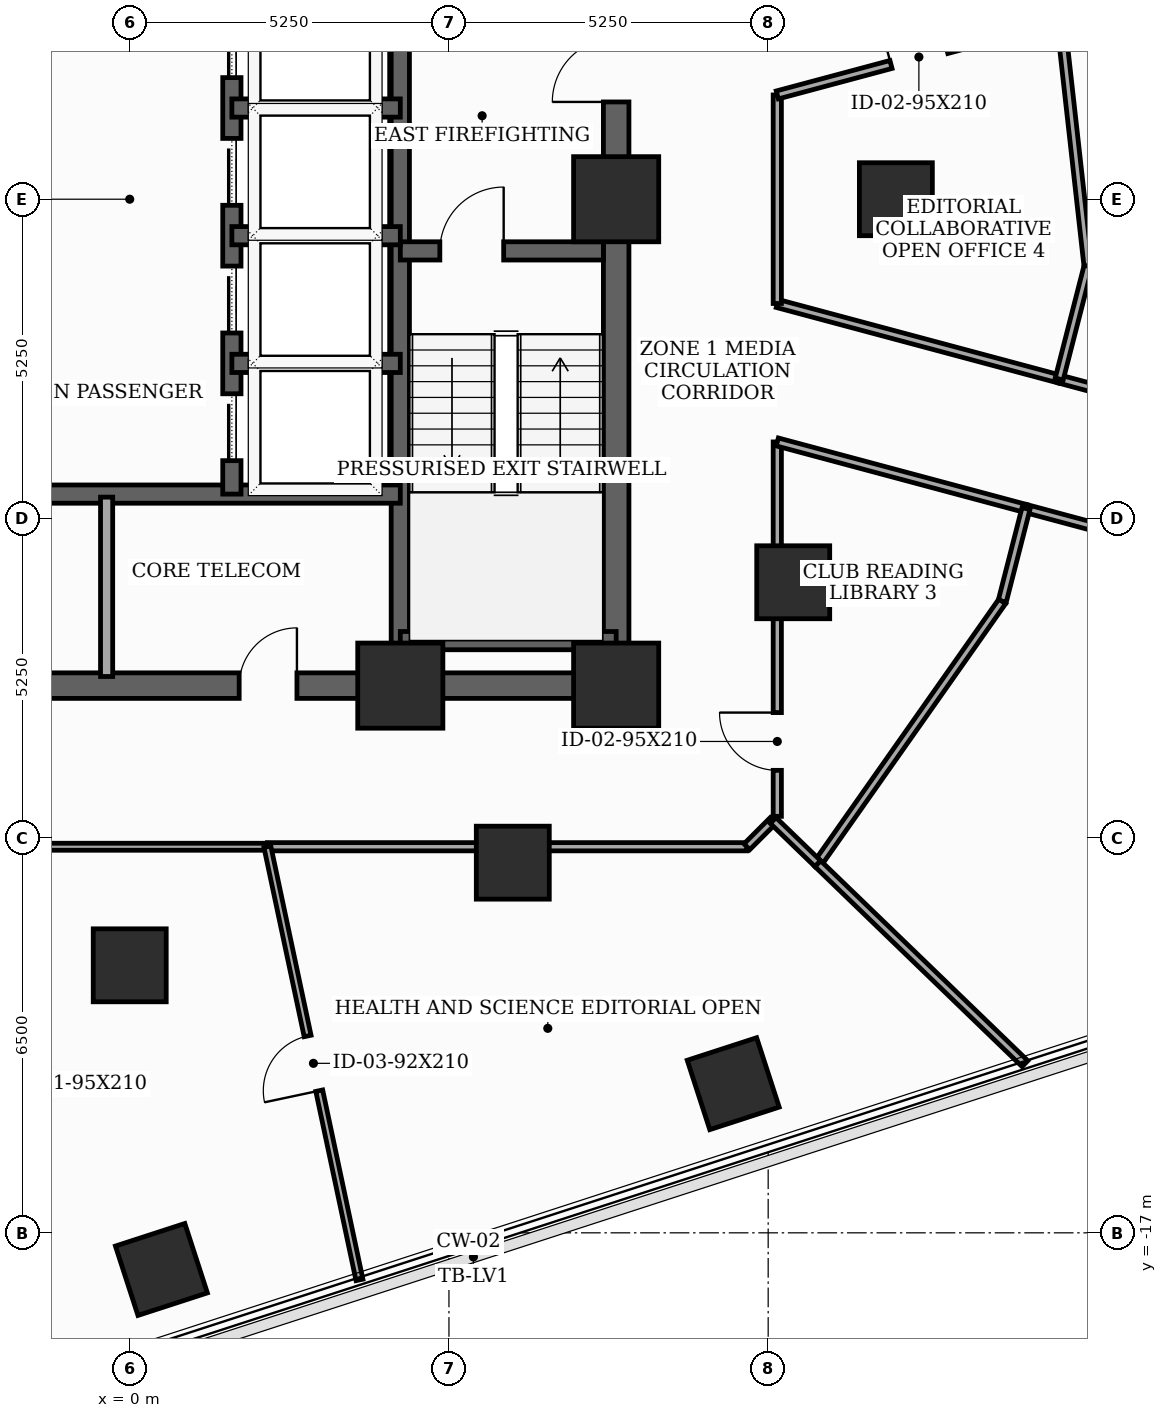
"""IFC4 building model, lengths in metres.
Left out: names, types, materials, properties, quantities, classifications, styles, units other than length and angle.
Written with IfcOpenShell. Run it as: python <this file> out.ifc"""

import sys

from ifc_helpers import new_model, si_unit, direction, frame, frame_2d, origin, origin_2d, place, context, subcontext, project, spatial, rectangle, extrude, element, fill, save


model = new_model("IFC4")
c1 = context("Model", 3, precision=1e-05, world=origin(), true_north=direction((0.0, 1.0)))
c2 = subcontext(c1, "Body", "Model", "MODEL_VIEW")
j1 = project(units=[si_unit("LENGTHUNIT", "METRE"), si_unit("PLANEANGLEUNIT", "RADIAN")], contexts=[c1])
p1 = place(None, origin())
s1 = spatial("IfcSite", under=j1, at=p1, CompositionType="ELEMENT")
p2 = place(p1, origin())
s2 = spatial("IfcBuilding", under=s1, at=p2, CompositionType="ELEMENT")
p3 = place(p2, frame((0.0, 0.0, 101.4)))
s3 = spatial("IfcBuildingStorey", under=s2, at=p3, CompositionType="ELEMENT", Elevation=101.4)
for number, where, z_axis, x_axis in (
    (1, (4.45, -8.0, 0.0), (0.0, 0.0, 1.0), (1.0, 0.0, 0.0)),
    (2, (8.0, -8.0, 0.0), (0.0, 0.0, 1.0), (1.0, 0.0, 0.0)),
    (3, (8.0, 0.0, 0.0), (0.0, 0.0, 1.0), (1.0, 0.0, 0.0)),
):
    element("IfcColumn", number, at=place(p3, frame(where, z_axis=z_axis, x_axis=x_axis)), inside=s3, PredefinedType="COLUMN", context=c2, shape_type="SweptSolid", body=[
        extrude(rectangle(XDim=1.4, YDim=1.4, at=origin_2d()), origin(), (0.0, 0.0, 1.0), 3.7),
    ])
for number, where, z_axis, x_axis in (
    (4, (12.6, 0.0, 0.0), (0.0, 0.0, 1.0), (1.0, 0.0, 0.0)),
    (5, (0.0, -12.6, 0.0), (0.0, 0.0, 1.0), (1.0, 0.0, 0.0)),
    (6, (6.3, -10.912, 0.0), (0.0, 0.0, 1.0), (1.0, 0.0, 0.0)),
    (7, (10.912, -6.3, 0.0), (0.0, 0.0, 1.0), (1.0, 0.0, 0.0)),
    (8, (0.521, -17.603, 0.0), (0.0, 0.0, 1.0), (0.951, 0.309, 0.0)),
    (9, (9.925, -14.547, 0.0), (0.0, 0.0, 1.0), (0.951, 0.309, 0.0)),
):
    element("IfcColumn", number, at=place(p3, frame(where, z_axis=z_axis, x_axis=x_axis)), inside=s3, PredefinedType="COLUMN", context=c2, shape_type="SweptSolid", body=[
        extrude(rectangle(XDim=1.2, YDim=1.2, at=origin_2d()), origin(), (0.0, 0.0, 1.0), 3.7),
    ])
p4 = place(p3, frame((8.0, -8.0, 0.0), z_axis=(0.0, 0.0, 1.0), x_axis=(0.0, 1.0, 0.0)))
e10 = element("IfcWall", 10, at=p4, inside=s3, PredefinedType="SHEAR", context=c2, shape_type="SweptSolid", body=[
    extrude(rectangle(XDim=16.0, YDim=0.42, at=frame_2d((8.0, 0.0))), origin(), (0.0, 0.0, 1.0), 3.5),
])
p5 = place(p4, frame((9.6, 0.0, 0.0)))
e11 = element("IfcOpeningElement", 11, at=p5, cuts=e10, PredefinedType="OPENING", context=c2, shape_type="SweptSolid", body=[
    extrude(rectangle(XDim=1.05, YDim=2.15, at=frame_2d((0.525, 1.075))), frame((0.0, 0.22, 0.0), z_axis=(0.0, -1.0, 0.0), x_axis=(1.0, 0.0, 0.0)), (0.0, 0.0, 1.0), 0.44),
])
p6 = place(p4, frame((14.229, 0.0, 0.0)))
e12 = element("IfcOpeningElement", 12, at=p6, cuts=e10, PredefinedType="OPENING", context=c2, shape_type="SweptSolid", body=[
    extrude(rectangle(XDim=0.85, YDim=2.02, at=frame_2d((0.425, 1.01))), frame((0.0, 0.22, 0.0), z_axis=(0.0, -1.0, 0.0), x_axis=(1.0, 0.0, 0.0)), (0.0, 0.0, 1.0), 0.44),
])
p7 = place(p3, frame((-8.0, -8.0, 0.0), z_axis=(0.0, 0.0, 1.0), x_axis=(1.0, 0.0, 0.0)))
e13 = element("IfcWall", 13, at=p7, inside=s3, PredefinedType="SHEAR", context=c2, shape_type="SweptSolid", body=[
    extrude(rectangle(XDim=16.0, YDim=0.42, at=frame_2d((8.0, 0.0))), origin(), (0.0, 0.0, 1.0), 3.5),
])
p8 = place(p7, frame((5.2, 0.0, 0.0)))
e14 = element("IfcOpeningElement", 14, at=p8, cuts=e13, PredefinedType="OPENING", context=c2, shape_type="SweptSolid", body=[
    extrude(rectangle(XDim=0.95, YDim=2.1, at=frame_2d((0.475, 1.05))), frame((0.0, 0.22, 0.0), z_axis=(0.0, -1.0, 0.0), x_axis=(1.0, 0.0, 0.0)), (0.0, 0.0, 1.0), 0.44),
])
p9 = place(p7, frame((9.8, 0.0, 0.0)))
e15 = element("IfcOpeningElement", 15, at=p9, cuts=e13, PredefinedType="OPENING", context=c2, shape_type="SweptSolid", body=[
    extrude(rectangle(XDim=0.95, YDim=2.1, at=frame_2d((0.475, 1.05))), frame((0.0, 0.22, 0.0), z_axis=(0.0, -1.0, 0.0), x_axis=(1.0, 0.0, 0.0)), (0.0, 0.0, 1.0), 0.44),
])
p10 = place(p3, frame((4.45, -7.79, 0.0), z_axis=(0.0, 0.0, 1.0), x_axis=(0.0, 1.0, 0.0)))
e16 = element("IfcWall", 16, at=p10, inside=s3, PredefinedType="SHEAR", context=c2, shape_type="SweptSolid", body=[
    extrude(rectangle(XDim=15.58, YDim=0.3, at=frame_2d((7.79, 0.0))), origin(), (0.0, 0.0, 1.0), 3.5),
])
p11 = place(p3, frame((4.45, -0.85, 0.0), z_axis=(0.0, 0.0, 1.0), x_axis=(1.0, 0.0, 0.0)))
e17 = element("IfcWall", 17, at=p11, inside=s3, PredefinedType="SHEAR", context=c2, shape_type="SweptSolid", body=[
    extrude(rectangle(XDim=3.34, YDim=0.3, at=frame_2d((1.67, 0.0))), origin(), (0.0, 0.0, 1.0), 3.5),
])
p12 = place(p11, frame((0.65, 0.0, 0.0)))
e18 = element("IfcOpeningElement", 18, at=p12, cuts=e17, PredefinedType="OPENING", context=c2, shape_type="SweptSolid", body=[
    extrude(rectangle(XDim=1.05, YDim=2.15, at=frame_2d((0.525, 1.075))), frame((0.0, 0.16, 0.0), z_axis=(0.0, -1.0, 0.0), x_axis=(1.0, 0.0, 0.0)), (0.0, 0.0, 1.0), 0.32),
])
p13 = place(p3, frame((4.45, -7.26, 0.0), z_axis=(0.0, 0.0, 1.0), x_axis=(1.0, 0.0, 0.0)))
e19 = element("IfcWall", 19, at=p13, inside=s3, PredefinedType="SHEAR", context=c2, shape_type="SweptSolid", body=[
    extrude(rectangle(XDim=3.55, YDim=0.3, at=frame_2d((1.775, 0.0))), origin(), (0.0, 0.0, 1.0), 3.5),
])
p14 = place(p3, frame((-4.45, -4.85, 0.0), z_axis=(0.0, 0.0, 1.0), x_axis=(1.0, 0.0, 0.0)))
e20 = element("IfcWall", 20, at=p14, inside=s3, PredefinedType="SHEAR", context=c2, shape_type="SweptSolid", body=[
    extrude(rectangle(XDim=8.9, YDim=0.3, at=frame_2d((4.45, 0.0))), origin(), (0.0, 0.0, 1.0), 3.5),
])
p15 = place(p3, frame((1.68, -4.85, 0.0), z_axis=(0.0, 0.0, 1.0), x_axis=(0.0, 1.0, 0.0)))
e21 = element("IfcWall", 21, at=p15, inside=s3, PredefinedType="SHEAR", context=c2, shape_type="SweptSolid", body=[
    extrude(rectangle(XDim=12.64, YDim=0.3, at=frame_2d((6.32, 0.0))), origin(), (0.0, 0.0, 1.0), 3.5),
])
p16 = place(p15, frame((0.55, 0.0, 0.0)))
e22 = element("IfcOpeningElement", 22, at=p16, cuts=e21, PredefinedType="OPENING", context=c2, shape_type="SweptSolid", body=[
    extrude(rectangle(XDim=1.1, YDim=2.1, at=frame_2d((0.55, 1.05))), frame((0.0, 0.16, 0.0), z_axis=(0.0, -1.0, 0.0), x_axis=(1.0, 0.0, 0.0)), (0.0, 0.0, 1.0), 0.32),
])
p17 = place(p15, frame((2.65, 0.0, 0.0)))
e23 = element("IfcOpeningElement", 23, at=p17, cuts=e21, PredefinedType="OPENING", context=c2, shape_type="SweptSolid", body=[
    extrude(rectangle(XDim=1.1, YDim=2.1, at=frame_2d((0.55, 1.05))), frame((0.0, 0.16, 0.0), z_axis=(0.0, -1.0, 0.0), x_axis=(1.0, 0.0, 0.0)), (0.0, 0.0, 1.0), 0.32),
])
p18 = place(p15, frame((4.75, 0.0, 0.0)))
e24 = element("IfcOpeningElement", 24, at=p18, cuts=e21, PredefinedType="OPENING", context=c2, shape_type="SweptSolid", body=[
    extrude(rectangle(XDim=1.1, YDim=2.1, at=frame_2d((0.55, 1.05))), frame((0.0, 0.16, 0.0), z_axis=(0.0, -1.0, 0.0), x_axis=(1.0, 0.0, 0.0)), (0.0, 0.0, 1.0), 0.32),
])
p19 = place(p15, frame((6.85, 0.0, 0.0)))
e25 = element("IfcOpeningElement", 25, at=p19, cuts=e21, PredefinedType="OPENING", context=c2, shape_type="SweptSolid", body=[
    extrude(rectangle(XDim=1.1, YDim=2.1, at=frame_2d((0.55, 1.05))), frame((0.0, 0.16, 0.0), z_axis=(0.0, -1.0, 0.0), x_axis=(1.0, 0.0, 0.0)), (0.0, 0.0, 1.0), 0.32),
])
p20 = place(p15, frame((8.95, 0.0, 0.0)))
e26 = element("IfcOpeningElement", 26, at=p20, cuts=e21, PredefinedType="OPENING", context=c2, shape_type="SweptSolid", body=[
    extrude(rectangle(XDim=1.1, YDim=2.1, at=frame_2d((0.55, 1.05))), frame((0.0, 0.16, 0.0), z_axis=(0.0, -1.0, 0.0), x_axis=(1.0, 0.0, 0.0)), (0.0, 0.0, 1.0), 0.32),
])
p21 = place(p15, frame((11.05, 0.0, 0.0)))
e27 = element("IfcOpeningElement", 27, at=p21, cuts=e21, PredefinedType="OPENING", context=c2, shape_type="SweptSolid", body=[
    extrude(rectangle(XDim=1.1, YDim=2.1, at=frame_2d((0.55, 1.05))), frame((0.0, 0.16, 0.0), z_axis=(0.0, -1.0, 0.0), x_axis=(1.0, 0.0, 0.0)), (0.0, 0.0, 1.0), 0.32),
])
for number, where, z_axis, x_axis in (
    (28, (1.68, 1.5, 0.0), (0.0, 0.0, 1.0), (1.0, 0.0, 0.0)),
    (29, (1.68, -2.7, 0.0), (0.0, 0.0, 1.0), (1.0, 0.0, 0.0)),
    (30, (1.68, -0.6, 0.0), (0.0, 0.0, 1.0), (1.0, 0.0, 0.0)),
):
    element("IfcWall", number, at=place(p3, frame(where, z_axis=z_axis, x_axis=x_axis)), inside=s3, PredefinedType="SHEAR", context=c2, shape_type="SweptSolid", body=[
        extrude(rectangle(XDim=2.77, YDim=0.3, at=frame_2d((1.385, 0.0))), origin(), (0.0, 0.0, 1.0), 3.5),
    ])
p22 = place(p3, frame((-0.38, -7.85, 0.0), z_axis=(0.0, 0.0, 1.0), x_axis=(0.0, 1.0, 0.0)))
e31 = element("IfcWall", 31, at=p22, inside=s3, PredefinedType="SOLIDWALL", context=c2, shape_type="SweptSolid", body=[
    extrude(rectangle(XDim=2.95, YDim=0.2, at=frame_2d((1.475, 0.0))), origin(), (0.0, 0.0, 1.0), 2.885),
])
p23 = place(p3, frame((-1.715, -10.65, 0.0), z_axis=(0.0, 0.0, 1.0), x_axis=(1.0, 0.0, 0.0)))
e32 = element("IfcWall", 32, at=p23, inside=s3, PredefinedType="PARTITIONING", context=c2, shape_type="SweptSolid", body=[
    extrude(rectangle(XDim=3.979, YDim=0.115, at=frame_2d((1.99, 0.0))), origin(), (0.0, 0.0, 1.0), 2.785),
])
p24 = place(p3, frame((14.74, -5.088, 0.0), z_axis=(0.0, 0.0, 1.0), x_axis=(0.965895912523, -0.258930659002, 0.0)))
e33 = element("IfcWall", 33, at=p24, inside=s3, PredefinedType="PARTITIONING", context=c2, shape_type="SweptSolid", body=[
    extrude(rectangle(XDim=7.045, YDim=0.135, at=frame_2d((3.522, 0.0))), origin(), (0.0, 0.0, 1.0), 2.935),
])
p25 = place(p3, frame((22.115, -4.787, 0.0), z_axis=(0.0, 0.0, 1.0), x_axis=(-0.965917838763, 0.258848853116, 0.0)))
e34 = element("IfcWall", 34, at=p25, inside=s3, PredefinedType="PARTITIONING", context=c2, shape_type="SweptSolid", body=[
    extrude(rectangle(XDim=7.07, YDim=0.135, at=frame_2d((3.535, 0.0))), origin(), (0.0, 0.0, 1.0), 2.935),
])
p26 = place(p25, frame((3.06, 0.0, 0.0)))
e35 = element("IfcOpeningElement", 35, at=p26, cuts=e34, PredefinedType="OPENING", context=c2, shape_type="SweptSolid", body=[
    extrude(rectangle(XDim=0.95, YDim=2.1, at=frame_2d((0.475, 1.05))), frame((0.0, 0.077, 0.0), z_axis=(0.0, -1.0, 0.0), x_axis=(1.0, 0.0, 0.0)), (0.0, 0.0, 1.0), 0.155),
])
p27 = place(p3, frame((10.65, -10.15, 0.0), z_axis=(0.0, 0.0, 1.0), x_axis=(0.0, 1.0, 0.0)))
e36 = element("IfcWall", 36, at=p27, inside=s3, PredefinedType="PARTITIONING", context=c2, shape_type="SweptSolid", body=[
    extrude(rectangle(XDim=6.158, YDim=0.135, at=frame_2d((3.079, 0.0))), origin(), (0.0, 0.0, 1.0), 2.785),
])
p28 = place(p27, frame((0.757, 0.0, 0.0)))
e37 = element("IfcOpeningElement", 37, at=p28, cuts=e36, PredefinedType="OPENING", context=c2, shape_type="SweptSolid", body=[
    extrude(rectangle(XDim=0.95, YDim=2.1, at=frame_2d((0.475, 1.05))), frame((0.0, 0.077, 0.0), z_axis=(0.0, -1.0, 0.0), x_axis=(1.0, 0.0, 0.0)), (0.0, 0.0, 1.0), 0.155),
])
p29 = place(p3, frame((10.65, -3.992, 0.0), z_axis=(0.0, 0.0, 1.0), x_axis=(0.965925146235, -0.258821583086, 0.0)))
e38 = element("IfcWall", 38, at=p29, inside=s3, PredefinedType="PARTITIONING", context=c2, shape_type="SweptSolid", body=[
    extrude(rectangle(XDim=4.234, YDim=0.135, at=frame_2d((2.117, 0.0))), origin(), (0.0, 0.0, 1.0), 2.785),
])
p30 = place(p3, frame((15.286, -2.957, 0.0), z_axis=(0.0, 0.0, 1.0), x_axis=(-0.965939651128, 0.258767444588, 0.0)))
e39 = element("IfcWall", 39, at=p30, inside=s3, PredefinedType="PARTITIONING", context=c2, shape_type="SweptSolid", body=[
    extrude(rectangle(XDim=4.8, YDim=0.135, at=frame_2d((2.4, 0.0))), origin(), (0.0, 0.0, 1.0), 2.785),
])
p31 = place(p3, frame((10.65, -1.715, 0.0), z_axis=(0.0, 0.0, 1.0), x_axis=(0.0, 1.0, 0.0)))
e40 = element("IfcWall", 40, at=p31, inside=s3, PredefinedType="PARTITIONING", context=c2, shape_type="SweptSolid", body=[
    extrude(rectangle(XDim=3.43, YDim=0.135, at=frame_2d((1.715, 0.0))), origin(), (0.0, 0.0, 1.0), 2.785),
])
p32 = place(p3, frame((10.65, 1.715, 0.0), z_axis=(0.0, 0.0, 1.0), x_axis=(0.965927482723, 0.258812863129, 0.0)))
e41 = element("IfcWall", 41, at=p32, inside=s3, PredefinedType="PARTITIONING", context=c2, shape_type="SweptSolid", body=[
    extrude(rectangle(XDim=4.821, YDim=0.135, at=frame_2d((2.411, 0.0))), origin(), (0.0, 0.0, 1.0), 2.785),
])
p33 = place(p32, frame((1.936, 0.0, 0.0)))
e42 = element("IfcOpeningElement", 42, at=p33, cuts=e41, PredefinedType="OPENING", context=c2, shape_type="SweptSolid", body=[
    extrude(rectangle(XDim=0.95, YDim=2.1, at=frame_2d((0.475, 1.05))), frame((0.0, 0.077, 0.0), z_axis=(0.0, -1.0, 0.0), x_axis=(1.0, 0.0, 0.0)), (0.0, 0.0, 1.0), 0.155),
])
p34 = place(p3, frame((2.264, -10.65, 0.0), z_axis=(0.0, 0.0, 1.0), x_axis=(1.0, 0.0, 0.0)))
e43 = element("IfcWall", 43, at=p34, inside=s3, PredefinedType="PARTITIONING", context=c2, shape_type="SweptSolid", body=[
    extrude(rectangle(XDim=7.886, YDim=0.135, at=frame_2d((3.943, 0.0))), origin(), (0.0, 0.0, 1.0), 2.785),
])
p35 = place(p3, frame((10.15, -10.65, 0.0), z_axis=(0.0, 0.0, 1.0), x_axis=(0.70730655707, 0.706906948845, 0.0)))
e44 = element("IfcWall", 44, at=p35, inside=s3, PredefinedType="PARTITIONING", context=c2, shape_type="SweptSolid", body=[
    extrude(rectangle(XDim=0.611, YDim=0.135, at=frame_2d((0.305, 0.0))), origin(), (0.0, 0.0, 1.0), 3.5),
])
p36 = place(p3, frame((3.778, -17.774, 0.0), z_axis=(0.0, 0.0, 1.0), x_axis=(-0.207917284361, 0.978146411773, 0.0)))
e45 = element("IfcWall", 45, at=p36, inside=s3, PredefinedType="PARTITIONING", context=c2, shape_type="SweptSolid", body=[
    extrude(rectangle(XDim=7.284, YDim=0.115, at=frame_2d((3.642, 0.0))), origin(), (0.0, 0.0, 1.0), 2.785),
])
p37 = place(p36, frame((3.182, 0.0, 0.0)))
e46 = element("IfcOpeningElement", 46, at=p37, cuts=e45, PredefinedType="OPENING", context=c2, shape_type="SweptSolid", body=[
    extrude(rectangle(XDim=0.92, YDim=2.1, at=frame_2d((0.46, 1.05))), frame((0.0, 0.067, 0.0), z_axis=(0.0, -1.0, 0.0), x_axis=(1.0, 0.0, 0.0)), (0.0, 0.0, 1.0), 0.135),
])
p38 = place(p3, frame((14.74, -5.088, 0.0), z_axis=(0.0, 0.0, 1.0), x_axis=(-0.247961711117, -0.968769833252, 0.0)))
e47 = element("IfcWall", 47, at=p38, inside=s3, PredefinedType="PARTITIONING", context=c2, shape_type="SweptSolid", body=[
    extrude(rectangle(XDim=1.576, YDim=0.135, at=frame_2d((0.788, 0.0))), origin(), (0.0, 0.0, 1.0), 3.5),
])
p39 = place(p3, frame((14.349, -6.615, 0.0), z_axis=(0.0, 0.0, 1.0), x_axis=(-0.575468172254, -0.817824175922, 0.0)))
e48 = element("IfcWall", 48, at=p39, inside=s3, PredefinedType="PARTITIONING", context=c2, shape_type="SweptSolid", body=[
    extrude(rectangle(XDim=5.272, YDim=0.135, at=frame_2d((2.636, 0.0))), origin(), (0.0, 0.0, 1.0), 2.785),
])
p40 = place(p3, frame((15.307, 2.963, 0.0), z_axis=(0.0, 0.0, 1.0), x_axis=(0.111256918124, -0.99379167745, 0.0)))
e49 = element("IfcWall", 49, at=p40, inside=s3, PredefinedType="PARTITIONING", context=c2, shape_type="SweptSolid", body=[
    extrude(rectangle(XDim=4.09, YDim=0.135, at=frame_2d((2.045, 0.0))), origin(), (0.0, 0.0, 1.0), 2.785),
])
p41 = place(p3, frame((15.762, -1.102, 0.0), z_axis=(0.0, 0.0, 1.0), x_axis=(-0.248590042538, -0.968608791386, 0.0)))
e50 = element("IfcWall", 50, at=p41, inside=s3, PredefinedType="PARTITIONING", context=c2, shape_type="SweptSolid", body=[
    extrude(rectangle(XDim=1.915, YDim=0.135, at=frame_2d((0.958, 0.0))), origin(), (0.0, 0.0, 1.0), 3.5),
])
p42 = place(p3, frame((11.315, -10.927, 0.0), z_axis=(0.0, 0.0, 1.0), x_axis=(0.719365057957, -0.694632214478, 0.0)))
e51 = element("IfcWall", 51, at=p42, inside=s3, PredefinedType="PARTITIONING", context=c2, shape_type="SweptSolid", body=[
    extrude(rectangle(XDim=4.738, YDim=0.135, at=frame_2d((2.369, 0.0))), origin(), (0.0, 0.0, 1.0), 2.935),
])
p43 = place(p3, frame((10.582, -10.218, 0.0), z_axis=(0.0, 0.0, 1.0), x_axis=(0.718741071219, -0.695277838381, 0.0)))
e52 = element("IfcWall", 52, at=p43, inside=s3, PredefinedType="PARTITIONING", context=c2, shape_type="SweptSolid", body=[
    extrude(rectangle(XDim=1.02, YDim=0.135, at=frame_2d((0.51, 0.0))), origin(), (0.0, 0.0, 1.0), 3.5),
])
p44 = place(p5, origin())
e53 = element("IfcDoor", 53, at=p44, inside=s3, OperationType="SINGLE_SWING_LEFT", PredefinedType="DOOR", context=c2, shape_type="SweptSolid", body=[
    extrude(rectangle(XDim=1.05, YDim=2.15, at=frame_2d((0.525, 1.075))), frame((0.0, 0.025, 0.0), z_axis=(0.0, -1.0, 0.0), x_axis=(1.0, 0.0, 0.0)), (0.0, 0.0, 1.0), 0.05),
])
fill(e11, e53)
p45 = place(p9, origin())
e54 = element("IfcDoor", 54, at=p45, inside=s3, OperationType="SINGLE_SWING_RIGHT", PredefinedType="DOOR", context=c2, shape_type="SweptSolid", body=[
    extrude(rectangle(XDim=0.95, YDim=2.1, at=frame_2d((0.475, 1.05))), frame((0.0, 0.025, 0.0), z_axis=(0.0, -1.0, 0.0), x_axis=(1.0, 0.0, 0.0)), (0.0, 0.0, 1.0), 0.05),
])
fill(e15, e54)
p46 = place(p12, origin())
e55 = element("IfcDoor", 55, at=p46, inside=s3, OperationType="SINGLE_SWING_RIGHT", PredefinedType="DOOR", context=c2, shape_type="SweptSolid", body=[
    extrude(rectangle(XDim=1.05, YDim=2.15, at=frame_2d((0.525, 1.075))), frame((0.0, 0.025, 0.0), z_axis=(0.0, -1.0, 0.0), x_axis=(1.0, 0.0, 0.0)), (0.0, 0.0, 1.0), 0.05),
])
fill(e18, e55)
p47 = place(p16, origin())
e56 = element("IfcDoor", 56, at=p47, inside=s3, OperationType="SLIDING_TO_LEFT", PredefinedType="DOOR", context=c2, shape_type="SweptSolid", body=[
    extrude(rectangle(XDim=1.1, YDim=2.1, at=frame_2d((0.55, 1.05))), frame((0.0, 0.025, 0.0), z_axis=(0.0, -1.0, 0.0), x_axis=(1.0, 0.0, 0.0)), (0.0, 0.0, 1.0), 0.05),
])
fill(e22, e56)
p48 = place(p17, origin())
e57 = element("IfcDoor", 57, at=p48, inside=s3, OperationType="SLIDING_TO_LEFT", PredefinedType="DOOR", context=c2, shape_type="SweptSolid", body=[
    extrude(rectangle(XDim=1.1, YDim=2.1, at=frame_2d((0.55, 1.05))), frame((0.0, 0.025, 0.0), z_axis=(0.0, -1.0, 0.0), x_axis=(1.0, 0.0, 0.0)), (0.0, 0.0, 1.0), 0.05),
])
fill(e23, e57)
p49 = place(p18, origin())
e58 = element("IfcDoor", 58, at=p49, inside=s3, OperationType="SLIDING_TO_LEFT", PredefinedType="DOOR", context=c2, shape_type="SweptSolid", body=[
    extrude(rectangle(XDim=1.1, YDim=2.1, at=frame_2d((0.55, 1.05))), frame((0.0, 0.025, 0.0), z_axis=(0.0, -1.0, 0.0), x_axis=(1.0, 0.0, 0.0)), (0.0, 0.0, 1.0), 0.05),
])
fill(e24, e58)
p50 = place(p19, origin())
e59 = element("IfcDoor", 59, at=p50, inside=s3, OperationType="SLIDING_TO_LEFT", PredefinedType="DOOR", context=c2, shape_type="SweptSolid", body=[
    extrude(rectangle(XDim=1.1, YDim=2.1, at=frame_2d((0.55, 1.05))), frame((0.0, 0.025, 0.0), z_axis=(0.0, -1.0, 0.0), x_axis=(1.0, 0.0, 0.0)), (0.0, 0.0, 1.0), 0.05),
])
fill(e25, e59)
p51 = place(p28, origin())
e60 = element("IfcDoor", 60, at=p51, inside=s3, OperationType="SINGLE_SWING_RIGHT", PredefinedType="DOOR", context=c2, shape_type="SweptSolid", body=[
    extrude(rectangle(XDim=0.95, YDim=2.1, at=frame_2d((0.475, 1.05))), frame((0.0, 0.025, 0.0), z_axis=(0.0, -1.0, 0.0), x_axis=(1.0, 0.0, 0.0)), (0.0, 0.0, 1.0), 0.05),
])
fill(e37, e60)
p52 = place(p33, origin())
e61 = element("IfcDoor", 61, at=p52, inside=s3, OperationType="SINGLE_SWING_LEFT", PredefinedType="DOOR", context=c2, shape_type="SweptSolid", body=[
    extrude(rectangle(XDim=0.95, YDim=2.1, at=frame_2d((0.475, 1.05))), frame((0.0, 0.025, 0.0), z_axis=(0.0, -1.0, 0.0), x_axis=(1.0, 0.0, 0.0)), (0.0, 0.0, 1.0), 0.05),
])
fill(e42, e61)
p53 = place(p37, origin())
e62 = element("IfcDoor", 62, at=p53, inside=s3, OperationType="SINGLE_SWING_LEFT", PredefinedType="DOOR", context=c2, shape_type="SweptSolid", body=[
    extrude(rectangle(XDim=0.92, YDim=2.1, at=frame_2d((0.46, 1.05))), frame((0.0, 0.025, 0.0), z_axis=(0.0, -1.0, 0.0), x_axis=(1.0, 0.0, 0.0)), (0.0, 0.0, 1.0), 0.05),
])
fill(e46, e62)
save(model, sys.argv[1])
